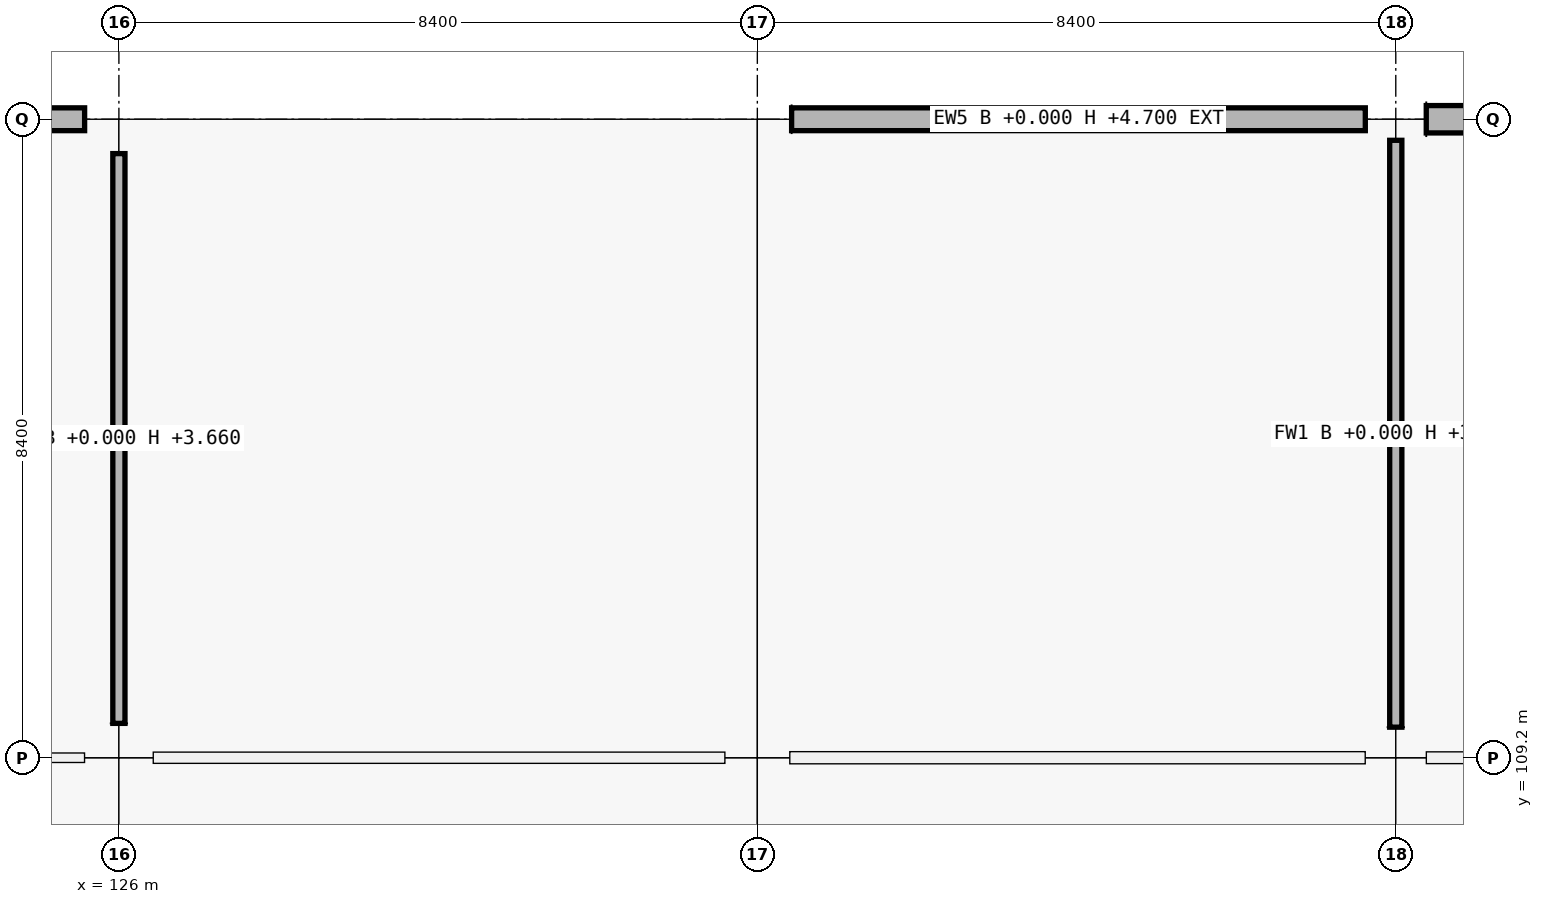
"""IFC4 building model, lengths in metres.
Left out: names, types, materials, properties, quantities, classifications, styles, units other than length and angle.
Written with IfcOpenShell. Run it as: python <this file> out.ifc"""

import sys

from ifc_helpers import new_model, si_unit, direction, frame, frame_2d, origin, origin_2d, place, context, subcontext, project, spatial, rectangle, extrude, element, fill, save


model = new_model("IFC4")
c1 = context("Model", 3, precision=1e-05, world=origin(), true_north=direction((0.0, 1.0)))
c2 = subcontext(c1, "Body", "Model", "MODEL_VIEW")
j1 = project(units=[si_unit("LENGTHUNIT", "METRE"), si_unit("PLANEANGLEUNIT", "RADIAN")], contexts=[c1])
p1 = place(None, origin())
s1 = spatial("IfcSite", under=j1, at=p1, CompositionType="ELEMENT")
p2 = place(p1, origin())
s2 = spatial("IfcBuilding", under=s1, at=p2, CompositionType="ELEMENT")
p3 = place(p2, origin())
s3 = spatial("IfcBuildingStorey", under=s2, at=p3, CompositionType="ELEMENT", Elevation=0.0)
for number, where, z_axis, x_axis in (
    (1, (126.0, 109.2, 0.0), (0.0, 0.0, 1.0), (1.0, 0.0, 0.0)),
    (2, (126.0, 117.6, 0.0), (0.0, 0.0, 1.0), (1.0, 0.0, 0.0)),
):
    element("IfcColumn", number, at=place(p3, frame(where, z_axis=z_axis, x_axis=x_axis)), inside=s3, PredefinedType="COLUMN", context=c2, shape_type="SweptSolid", body=[
        extrude(rectangle(XDim=0.9, YDim=0.9, at=origin_2d()), origin(), (0.0, 0.0, 1.0), 5.76),
    ])
p4 = place(p3, frame((134.4, 109.2, 0.0), z_axis=(0.0, 0.0, 1.0), x_axis=(1.0, 0.0, 0.0)))
e3 = element("IfcColumn", 3, at=p4, inside=s3, PredefinedType="COLUMN", context=c2, shape_type="SweptSolid", body=[
    extrude(rectangle(XDim=0.85, YDim=0.85, at=origin_2d()), origin(), (0.0, 0.0, 1.0), 5.76),
])
p5 = place(p3, frame((134.4, 117.6, 0.0), z_axis=(0.0, 0.0, 1.0), x_axis=(1.0, 0.0, 0.0)))
e4 = element("IfcColumn", 4, at=p5, inside=s3, PredefinedType="COLUMN", context=c2, shape_type="SweptSolid", body=[
    extrude(rectangle(XDim=0.9, YDim=0.6, at=origin_2d()), origin(), (0.0, 0.0, 1.0), 5.76),
])
p6 = place(p3, frame((142.8, 109.2, 0.0), z_axis=(0.0, 0.0, 1.0), x_axis=(1.0, 0.0, 0.0)))
e5 = element("IfcColumn", 5, at=p6, inside=s3, PredefinedType="COLUMN", context=c2, shape_type="SweptSolid", body=[
    extrude(rectangle(XDim=0.8, YDim=0.8, at=origin_2d()), origin(), (0.0, 0.0, 1.0), 5.76),
])
p7 = place(p3, frame((142.8, 117.6, 0.0), z_axis=(0.0, 0.0, 1.0), x_axis=(1.0, 0.0, 0.0)))
e6 = element("IfcColumn", 6, at=p7, inside=s3, PredefinedType="COLUMN", context=c2, shape_type="SweptSolid", body=[
    extrude(rectangle(XDim=0.8, YDim=0.55, at=origin_2d()), origin(), (0.0, 0.0, 1.0), 5.76),
])
p8 = place(p3, frame((118.051, 117.6, 0.0), z_axis=(0.0, 0.0, 1.0), x_axis=(1.0, 0.0, 0.0)))
e7 = element("IfcWall", 7, at=p8, inside=s3, PredefinedType="SOLIDWALL", context=c2, shape_type="SweptSolid", body=[
    extrude(rectangle(XDim=7.498, YDim=0.3, at=frame_2d((3.749, 0.0))), origin(), (0.0, 0.0, 1.0), 4.7),
])
p9 = place(p8, frame((2.674, 0.0, 0.9)))
e8 = element("IfcOpeningElement", 8, at=p9, cuts=e7, PredefinedType="OPENING", context=c2, shape_type="SweptSolid", body=[
    extrude(rectangle(XDim=2.15, YDim=1.95, at=frame_2d((1.075, 0.975))), frame((0.0, 0.15, 0.0), z_axis=(0.0, -1.0, 0.0), x_axis=(1.0, 0.0, 0.0)), (0.0, 0.0, 1.0), 0.3),
])
p10 = place(p3, frame((134.851, 117.6, 0.0), z_axis=(0.0, 0.0, 1.0), x_axis=(1.0, 0.0, 0.0)))
e9 = element("IfcWall", 9, at=p10, inside=s3, PredefinedType="SOLIDWALL", context=c2, shape_type="SweptSolid", body=[
    extrude(rectangle(XDim=7.548, YDim=0.3, at=frame_2d((3.774, 0.0))), origin(), (0.0, 0.0, 1.0), 4.7),
])
p11 = place(p10, frame((2.799, 0.0, 0.9)))
e10 = element("IfcOpeningElement", 10, at=p11, cuts=e9, PredefinedType="OPENING", context=c2, shape_type="SweptSolid", body=[
    extrude(rectangle(XDim=1.95, YDim=1.6, at=frame_2d((0.975, 0.8))), frame((0.0, 0.15, 0.0), z_axis=(0.0, -1.0, 0.0), x_axis=(1.0, 0.0, 0.0)), (0.0, 0.0, 1.0), 0.3),
])
p12 = place(p3, frame((143.201, 117.6, 0.0), z_axis=(0.0, 0.0, 1.0), x_axis=(1.0, 0.0, 0.0)))
e11 = element("IfcWall", 11, at=p12, inside=s3, PredefinedType="SOLIDWALL", context=c2, shape_type="SweptSolid", body=[
    extrude(rectangle(XDim=7.598, YDim=0.36, at=frame_2d((3.799, 0.0))), origin(), (0.0, 0.0, 1.0), 4.7),
])
p13 = place(p12, frame((2.799, 0.0, 0.0)))
e12 = element("IfcOpeningElement", 12, at=p13, cuts=e11, PredefinedType="OPENING", context=c2, shape_type="SweptSolid", body=[
    extrude(rectangle(XDim=2.0, YDim=2.25, at=frame_2d((1.0, 1.125))), frame((0.0, 0.18, 0.0), z_axis=(0.0, -1.0, 0.0), x_axis=(1.0, 0.0, 0.0)), (0.0, 0.0, 1.0), 0.36),
])
p14 = place(p3, frame((118.052, 109.2, 0.0), z_axis=(0.0, 0.0, 1.0), x_axis=(1.0, 0.0, 0.0)))
e13 = element("IfcWall", 13, at=p14, inside=s3, PredefinedType="PARTITIONING", context=c2, shape_type="SweptSolid", body=[
    extrude(rectangle(XDim=7.496, YDim=0.125, at=frame_2d((3.748, 0.0))), origin(), (0.0, 0.0, 1.0), 3.66),
])
p15 = place(p14, frame((3.288, 0.0, 0.0)))
e14 = element("IfcOpeningElement", 14, at=p15, cuts=e13, PredefinedType="OPENING", context=c2, shape_type="SweptSolid", body=[
    extrude(rectangle(XDim=0.92, YDim=2.15, at=frame_2d((0.46, 1.075))), frame((0.0, 0.062, 0.0), z_axis=(0.0, -1.0, 0.0), x_axis=(1.0, 0.0, 0.0)), (0.0, 0.0, 1.0), 0.125),
])
p16 = place(p3, frame((126.452, 109.2, 0.0), z_axis=(0.0, 0.0, 1.0), x_axis=(1.0, 0.0, 0.0)))
e15 = element("IfcWall", 15, at=p16, inside=s3, PredefinedType="PARTITIONING", context=c2, shape_type="SweptSolid", body=[
    extrude(rectangle(XDim=7.521, YDim=0.148, at=frame_2d((3.76, 0.0))), origin(), (0.0, 0.0, 1.0), 3.66),
])
p17 = place(p16, frame((3.236, 0.0, 0.0)))
e16 = element("IfcOpeningElement", 16, at=p17, cuts=e15, PredefinedType="OPENING", context=c2, shape_type="SweptSolid", body=[
    extrude(rectangle(XDim=1.05, YDim=2.15, at=frame_2d((0.525, 1.075))), frame((0.0, 0.074, 0.0), z_axis=(0.0, -1.0, 0.0), x_axis=(1.0, 0.0, 0.0)), (0.0, 0.0, 1.0), 0.148),
])
p18 = place(p3, frame((134.827, 109.2, 0.0), z_axis=(0.0, 0.0, 1.0), x_axis=(1.0, 0.0, 0.0)))
e17 = element("IfcWall", 17, at=p18, inside=s3, PredefinedType="PARTITIONING", context=c2, shape_type="SweptSolid", body=[
    extrude(rectangle(XDim=7.571, YDim=0.16, at=frame_2d((3.786, 0.0))), origin(), (0.0, 0.0, 1.0), 3.66),
])
p19 = place(p18, frame((3.285, 0.0, 0.0)))
e18 = element("IfcOpeningElement", 18, at=p19, cuts=e17, PredefinedType="OPENING", context=c2, shape_type="SweptSolid", body=[
    extrude(rectangle(XDim=1.0, YDim=2.15, at=frame_2d((0.5, 1.075))), frame((0.0, 0.08, 0.0), z_axis=(0.0, -1.0, 0.0), x_axis=(1.0, 0.0, 0.0)), (0.0, 0.0, 1.0), 0.16),
])
p20 = place(p3, frame((143.202, 109.2, 0.0), z_axis=(0.0, 0.0, 1.0), x_axis=(1.0, 0.0, 0.0)))
e19 = element("IfcWall", 19, at=p20, inside=s3, PredefinedType="PARTITIONING", context=c2, shape_type="SweptSolid", body=[
    extrude(rectangle(XDim=7.596, YDim=0.155, at=frame_2d((3.798, 0.0))), origin(), (0.0, 0.0, 1.0), 3.66),
])
p21 = place(p20, frame((3.333, 0.0, 0.0)))
e20 = element("IfcOpeningElement", 20, at=p21, cuts=e19, PredefinedType="OPENING", context=c2, shape_type="SweptSolid", body=[
    extrude(rectangle(XDim=0.93, YDim=2.12, at=frame_2d((0.465, 1.06))), frame((0.0, 0.078, 0.0), z_axis=(0.0, -1.0, 0.0), x_axis=(1.0, 0.0, 0.0)), (0.0, 0.0, 1.0), 0.155),
])
p22 = place(p3, frame((126.0, 109.652, 0.0), z_axis=(0.0, 0.0, 1.0), x_axis=(0.0, 1.0, 0.0)))
e21 = element("IfcWall", 21, at=p22, inside=s3, PredefinedType="PARTITIONING", context=c2, shape_type="SweptSolid", body=[
    extrude(rectangle(XDim=7.496, YDim=0.16, at=frame_2d((3.748, 0.0))), origin(), (0.0, 0.0, 1.0), 3.66),
])
p23 = place(p22, frame((3.173, 0.0, 0.0)))
e22 = element("IfcOpeningElement", 22, at=p23, cuts=e21, PredefinedType="OPENING", context=c2, shape_type="SweptSolid", body=[
    extrude(rectangle(XDim=1.15, YDim=2.2, at=frame_2d((0.575, 1.1))), frame((0.0, 0.08, 0.0), z_axis=(0.0, -1.0, 0.0), x_axis=(1.0, 0.0, 0.0)), (0.0, 0.0, 1.0), 0.16),
])
p24 = place(p3, frame((142.8, 109.602, 0.0), z_axis=(0.0, 0.0, 1.0), x_axis=(0.0, 1.0, 0.0)))
e23 = element("IfcWall", 23, at=p24, inside=s3, PredefinedType="PARTITIONING", context=c2, shape_type="SweptSolid", body=[
    extrude(rectangle(XDim=7.721, YDim=0.16, at=frame_2d((3.86, 0.0))), origin(), (0.0, 0.0, 1.0), 3.66),
])
p25 = place(p24, frame((3.311, 0.0, 0.0)))
e24 = element("IfcOpeningElement", 24, at=p25, cuts=e23, PredefinedType="OPENING", context=c2, shape_type="SweptSolid", body=[
    extrude(rectangle(XDim=1.1, YDim=2.15, at=frame_2d((0.55, 1.075))), frame((0.0, 0.08, 0.0), z_axis=(0.0, -1.0, 0.0), x_axis=(1.0, 0.0, 0.0)), (0.0, 0.0, 1.0), 0.16),
])
p26 = place(p11, origin())
e25 = element("IfcWindow", 25, at=p26, inside=s3, PartitioningType="SINGLE_PANEL", PredefinedType="WINDOW", context=c2, shape_type="SweptSolid", body=[
    extrude(rectangle(XDim=1.95, YDim=1.6, at=frame_2d((0.975, 0.8))), frame((0.0, 0.03, 0.0), z_axis=(0.0, -1.0, 0.0), x_axis=(1.0, 0.0, 0.0)), (0.0, 0.0, 1.0), 0.06),
])
fill(e10, e25)
p27 = place(p17, origin())
e26 = element("IfcDoor", 26, at=p27, inside=s3, OperationType="SINGLE_SWING_RIGHT", PredefinedType="DOOR", context=c2, shape_type="SweptSolid", body=[
    extrude(rectangle(XDim=1.05, YDim=2.15, at=frame_2d((0.525, 1.075))), frame((0.0, 0.025, 0.0), z_axis=(0.0, -1.0, 0.0), x_axis=(1.0, 0.0, 0.0)), (0.0, 0.0, 1.0), 0.05),
])
fill(e16, e26)
p28 = place(p19, origin())
e27 = element("IfcDoor", 27, at=p28, inside=s3, OperationType="SINGLE_SWING_RIGHT", PredefinedType="DOOR", context=c2, shape_type="SweptSolid", body=[
    extrude(rectangle(XDim=1.0, YDim=2.15, at=frame_2d((0.5, 1.075))), frame((0.0, 0.025, 0.0), z_axis=(0.0, -1.0, 0.0), x_axis=(1.0, 0.0, 0.0)), (0.0, 0.0, 1.0), 0.05),
])
fill(e18, e27)
p29 = place(p23, origin())
e28 = element("IfcDoor", 28, at=p29, inside=s3, OperationType="SINGLE_SWING_RIGHT", PredefinedType="DOOR", context=c2, shape_type="SweptSolid", body=[
    extrude(rectangle(XDim=1.15, YDim=2.2, at=frame_2d((0.575, 1.1))), frame((0.0, 0.025, 0.0), z_axis=(0.0, -1.0, 0.0), x_axis=(1.0, 0.0, 0.0)), (0.0, 0.0, 1.0), 0.05),
])
fill(e22, e28)
p30 = place(p25, origin())
e29 = element("IfcDoor", 29, at=p30, inside=s3, OperationType="SINGLE_SWING_RIGHT", PredefinedType="DOOR", context=c2, shape_type="SweptSolid", body=[
    extrude(rectangle(XDim=1.1, YDim=2.15, at=frame_2d((0.55, 1.075))), frame((0.0, 0.025, 0.0), z_axis=(0.0, -1.0, 0.0), x_axis=(1.0, 0.0, 0.0)), (0.0, 0.0, 1.0), 0.05),
])
fill(e24, e29)
save(model, sys.argv[1])
